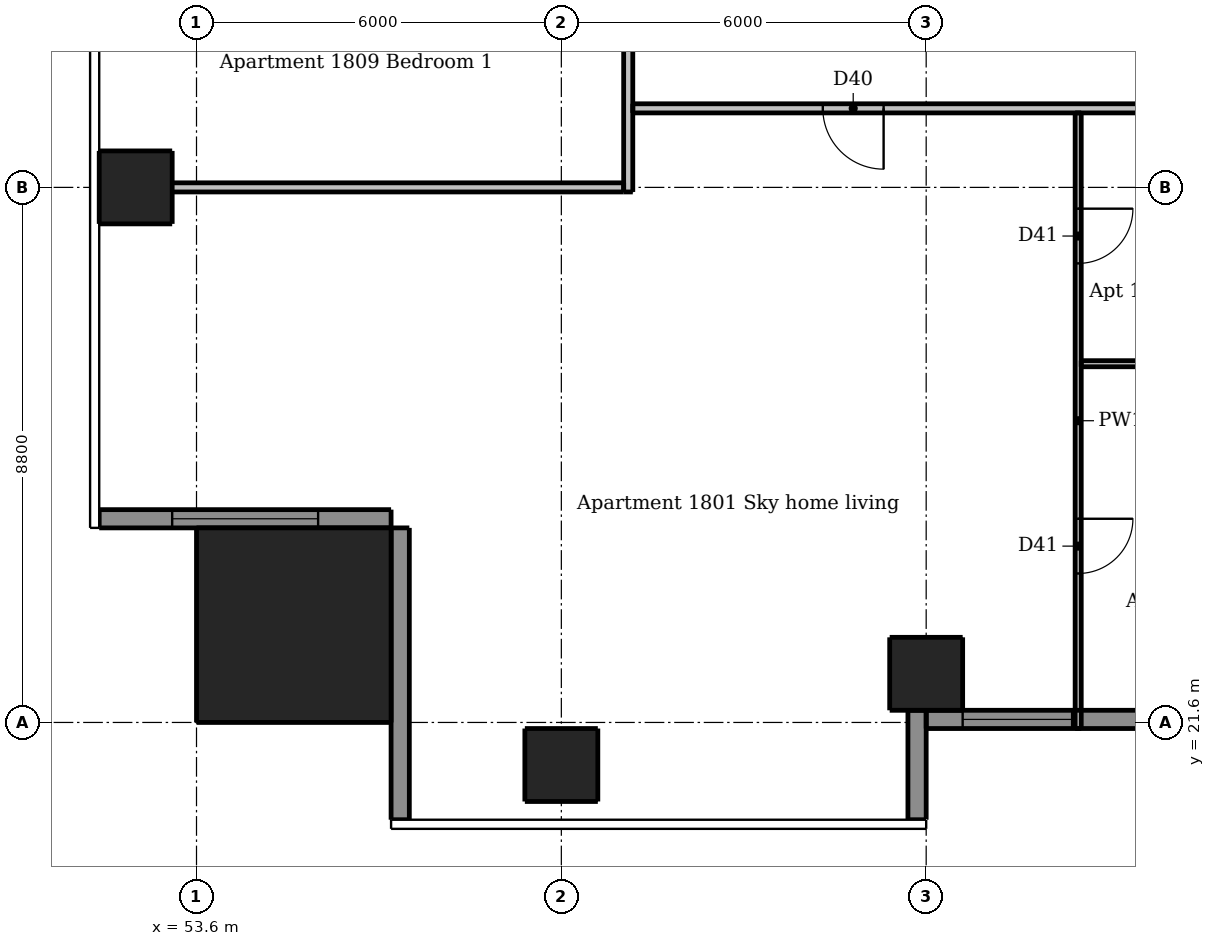
"""IFC4 building model, lengths in metres.
Left out: names, types, materials, properties, quantities, classifications, styles, units other than length and angle.
Written with IfcOpenShell. Run it as: python <this file> out.ifc"""

import sys

from ifc_helpers import new_model, si_unit, direction, frame, frame_2d, origin, origin_2d, place, context, subcontext, project, spatial, rectangle, extrude, element, fill, save


model = new_model("IFC4")
c1 = context("Model", 3, precision=1e-05, world=origin(), true_north=direction((0.0, 1.0)))
c2 = subcontext(c1, "Body", "Model", "MODEL_VIEW")
j1 = project(units=[si_unit("LENGTHUNIT", "METRE"), si_unit("PLANEANGLEUNIT", "RADIAN")], contexts=[c1])
p1 = place(None, origin())
s1 = spatial("IfcSite", under=j1, at=p1, CompositionType="ELEMENT")
p2 = place(p1, origin())
s2 = spatial("IfcBuilding", under=s1, at=p2, CompositionType="ELEMENT")
p3 = place(p2, frame((0.0, 0.0, 66.4)))
s3 = spatial("IfcBuildingStorey", under=s2, at=p3, CompositionType="ELEMENT", Elevation=66.4)
for number, where, z_axis, x_axis in (
    (1, (59.6, 20.9, 0.0), (0.0, 0.0, 1.0), (1.0, 0.0, 0.0)),
    (2, (65.6, 22.4, 0.0), (0.0, 0.0, 1.0), (1.0, 0.0, 0.0)),
    (3, (52.6, 30.4, 0.0), (0.0, 0.0, 1.0), (1.0, 0.0, 0.0)),
):
    element("IfcColumn", number, at=place(p3, frame(where, z_axis=z_axis, x_axis=x_axis)), inside=s3, PredefinedType="COLUMN", context=c2, shape_type="SweptSolid", body=[
        extrude(rectangle(XDim=1.2, YDim=1.2, at=origin_2d()), origin(), (0.0, 0.0, 1.0), 2.95),
    ])
p4 = place(p3, frame((55.2, 23.2, 0.0), z_axis=(0.0, 0.0, 1.0), x_axis=(1.0, 0.0, 0.0)))
e4 = element("IfcColumn", 4, at=p4, inside=s3, PredefinedType="COLUMN", context=c2, shape_type="SweptSolid", body=[
    extrude(rectangle(XDim=3.2, YDim=3.2, at=origin_2d()), origin(), (0.0, 0.0, 1.0), 3.3),
])
p5 = place(p3, frame((65.45, 20.0, 0.0), z_axis=(0.0, 0.0, 1.0), x_axis=(0.0, 1.0, 0.0)))
e5 = element("IfcWall", 5, at=p5, inside=s3, PredefinedType="SOLIDWALL", context=c2, shape_type="SweptSolid", body=[
    extrude(rectangle(XDim=1.8, YDim=0.3, at=frame_2d((0.9, 0.0))), origin(), (0.0, 0.0, 1.0), 2.95),
])
p6 = place(p3, frame((52.0, 24.95, 0.0), z_axis=(0.0, 0.0, 1.0), x_axis=(1.0, 0.0, 0.0)))
e6 = element("IfcWall", 6, at=p6, inside=s3, PredefinedType="SOLIDWALL", context=c2, shape_type="SweptSolid", body=[
    extrude(rectangle(XDim=4.8, YDim=0.3, at=frame_2d((2.4, 0.0))), origin(), (0.0, 0.0, 1.0), 2.95),
])
p7 = place(p6, frame((1.2, 0.0, 0.15)))
e7 = element("IfcOpeningElement", 7, at=p7, cuts=e6, PredefinedType="OPENING", context=c2, shape_type="SweptSolid", body=[
    extrude(rectangle(XDim=2.4, YDim=2.1, at=frame_2d((1.2, 1.05))), frame((0.0, 0.16, 0.0), z_axis=(0.0, -1.0, 0.0), x_axis=(1.0, 0.0, 0.0)), (0.0, 0.0, 1.0), 0.32),
])
p8 = place(p3, frame((56.95, 24.8, 0.0), z_axis=(0.0, 0.0, 1.0), x_axis=(0.0, -1.0, 0.0)))
e8 = element("IfcWall", 8, at=p8, inside=s3, PredefinedType="SOLIDWALL", context=c2, shape_type="SweptSolid", body=[
    extrude(rectangle(XDim=4.8, YDim=0.3, at=frame_2d((2.4, 0.0))), origin(), (0.0, 0.0, 1.0), 2.95),
])
p9 = place(p3, frame((65.6, 21.65, 0.0), z_axis=(0.0, 0.0, 1.0), x_axis=(1.0, 0.0, 0.0)))
e9 = element("IfcWall", 9, at=p9, inside=s3, PredefinedType="SOLIDWALL", context=c2, shape_type="SweptSolid", body=[
    extrude(rectangle(XDim=6.0, YDim=0.3, at=frame_2d((3.0, 0.0))), origin(), (0.0, 0.0, 1.0), 2.341),
])
p10 = place(p9, frame((0.6, 0.0, 0.15)))
e10 = element("IfcOpeningElement", 10, at=p10, cuts=e9, PredefinedType="OPENING", context=c2, shape_type="SweptSolid", body=[
    extrude(rectangle(XDim=1.8, YDim=2.1, at=frame_2d((0.9, 1.05))), frame((0.0, 0.16, 0.0), z_axis=(0.0, -1.0, 0.0), x_axis=(1.0, 0.0, 0.0)), (0.0, 0.0, 1.0), 0.32),
])
p11 = place(p9, frame((3.6, 0.0, 0.15)))
e11 = element("IfcOpeningElement", 11, at=p11, cuts=e9, PredefinedType="OPENING", context=c2, shape_type="SweptSolid", body=[
    extrude(rectangle(XDim=1.8, YDim=2.1, at=frame_2d((0.9, 1.05))), frame((0.0, 0.16, 0.0), z_axis=(0.0, -1.0, 0.0), x_axis=(1.0, 0.0, 0.0)), (0.0, 0.0, 1.0), 0.32),
])
p12 = place(p3, frame((68.1, 31.625, 0.0), z_axis=(0.0, 0.0, 1.0), x_axis=(0.0, -1.0, 0.0)))
e12 = element("IfcWall", 12, at=p12, inside=s3, PredefinedType="PARTITIONING", context=c2, shape_type="SweptSolid", body=[
    extrude(rectangle(XDim=10.125, YDim=0.1, at=frame_2d((5.062, 0.0))), origin(), (0.0, 0.0, 1.0), 2.95),
])
p13 = place(p12, frame((1.575, 0.0, 0.0)))
e13 = element("IfcOpeningElement", 13, at=p13, cuts=e12, PredefinedType="OPENING", context=c2, shape_type="SweptSolid", body=[
    extrude(rectangle(XDim=0.9, YDim=2.1, at=frame_2d((0.45, 1.05))), frame((0.0, 0.06, 0.0), z_axis=(0.0, -1.0, 0.0), x_axis=(1.0, 0.0, 0.0)), (0.0, 0.0, 1.0), 0.12),
])
p14 = place(p12, frame((6.675, 0.0, 0.0)))
e14 = element("IfcOpeningElement", 14, at=p14, cuts=e12, PredefinedType="OPENING", context=c2, shape_type="SweptSolid", body=[
    extrude(rectangle(XDim=0.9, YDim=2.1, at=frame_2d((0.45, 1.05))), frame((0.0, 0.06, 0.0), z_axis=(0.0, -1.0, 0.0), x_axis=(1.0, 0.0, 0.0)), (0.0, 0.0, 1.0), 0.12),
])
p15 = place(p3, frame((68.15, 27.5, 0.0), z_axis=(0.0, 0.0, 1.0), x_axis=(1.0, 0.0, 0.0)))
e15 = element("IfcWall", 15, at=p15, inside=s3, PredefinedType="PARTITIONING", context=c2, shape_type="SweptSolid", body=[
    extrude(rectangle(XDim=6.375, YDim=0.1, at=frame_2d((3.188, 0.0))), origin(), (0.0, 0.0, 1.0), 2.95),
])
p16 = place(p15, frame((4.0, 0.0, 0.0)))
e16 = element("IfcOpeningElement", 16, at=p16, cuts=e15, PredefinedType="OPENING", context=c2, shape_type="SweptSolid", body=[
    extrude(rectangle(XDim=0.8, YDim=2.1, at=frame_2d((0.4, 1.05))), frame((0.0, 0.06, 0.0), z_axis=(0.0, -1.0, 0.0), x_axis=(1.0, 0.0, 0.0)), (0.0, 0.0, 1.0), 0.12),
])
p17 = place(p3, frame((60.7, 30.325, 0.0), z_axis=(0.0, 0.0, 1.0), x_axis=(0.0, 1.0, 0.0)))
e17 = element("IfcWall", 17, at=p17, inside=s3, PredefinedType="PARTITIONING", context=c2, shape_type="SweptSolid", body=[
    extrude(rectangle(XDim=28.9, YDim=0.15, at=frame_2d((14.45, 0.0))), origin(), (0.0, 0.0, 1.0), 2.95),
])
p18 = place(p17, frame((7.375, 0.0, 0.0)))
e18 = element("IfcOpeningElement", 18, at=p18, cuts=e17, PredefinedType="OPENING", context=c2, shape_type="SweptSolid", body=[
    extrude(rectangle(XDim=1.0, YDim=2.1, at=frame_2d((0.5, 1.05))), frame((0.0, 0.085, 0.0), z_axis=(0.0, -1.0, 0.0), x_axis=(1.0, 0.0, 0.0)), (0.0, 0.0, 1.0), 0.17),
])
p19 = place(p17, frame((14.575, 0.0, 0.0)))
e19 = element("IfcOpeningElement", 19, at=p19, cuts=e17, PredefinedType="OPENING", context=c2, shape_type="SweptSolid", body=[
    extrude(rectangle(XDim=1.0, YDim=2.1, at=frame_2d((0.5, 1.05))), frame((0.0, 0.085, 0.0), z_axis=(0.0, -1.0, 0.0), x_axis=(1.0, 0.0, 0.0)), (0.0, 0.0, 1.0), 0.17),
])
p20 = place(p17, frame((26.025, 0.0, 0.0)))
e20 = element("IfcOpeningElement", 20, at=p20, cuts=e17, PredefinedType="OPENING", context=c2, shape_type="SweptSolid", body=[
    extrude(rectangle(XDim=1.0, YDim=2.1, at=frame_2d((0.5, 1.05))), frame((0.0, 0.085, 0.0), z_axis=(0.0, -1.0, 0.0), x_axis=(1.0, 0.0, 0.0)), (0.0, 0.0, 1.0), 0.17),
])
p21 = place(p3, frame((89.525, 31.7, 0.0), z_axis=(0.0, 0.0, 1.0), x_axis=(-1.0, 0.0, 0.0)))
e21 = element("IfcWall", 21, at=p21, inside=s3, PredefinedType="PARTITIONING", context=c2, shape_type="SweptSolid", body=[
    extrude(rectangle(XDim=28.75, YDim=0.15, at=frame_2d((14.375, 0.0))), origin(), (0.0, 0.0, 1.0), 2.95),
])
p22 = place(p21, frame((24.625, 0.0, 0.0)))
e22 = element("IfcOpeningElement", 22, at=p22, cuts=e21, PredefinedType="OPENING", context=c2, shape_type="SweptSolid", body=[
    extrude(rectangle(XDim=1.0, YDim=2.1, at=frame_2d((0.5, 1.05))), frame((0.0, 0.085, 0.0), z_axis=(0.0, -1.0, 0.0), x_axis=(1.0, 0.0, 0.0)), (0.0, 0.0, 1.0), 0.17),
])
p23 = place(p21, frame((8.425, 0.0, 0.0)))
e23 = element("IfcOpeningElement", 23, at=p23, cuts=e21, PredefinedType="OPENING", context=c2, shape_type="SweptSolid", body=[
    extrude(rectangle(XDim=1.0, YDim=2.1, at=frame_2d((0.5, 1.05))), frame((0.0, 0.085, 0.0), z_axis=(0.0, -1.0, 0.0), x_axis=(1.0, 0.0, 0.0)), (0.0, 0.0, 1.0), 0.17),
])
p24 = place(p3, frame((52.0, 30.4, 0.0), z_axis=(0.0, 0.0, 1.0), x_axis=(1.0, 0.0, 0.0)))
e24 = element("IfcWall", 24, at=p24, inside=s3, PredefinedType="PARTITIONING", context=c2, shape_type="SweptSolid", body=[
    extrude(rectangle(XDim=8.625, YDim=0.15, at=frame_2d((4.312, 0.0))), origin(), (0.0, 0.0, 1.0), 2.332),
])
p25 = place(p7, origin())
e25 = element("IfcWindow", 25, at=p25, inside=s3, PartitioningType="DOUBLE_PANEL_VERTICAL", PredefinedType="WINDOW", context=c2, shape_type="SweptSolid", body=[
    extrude(rectangle(XDim=2.4, YDim=2.1, at=frame_2d((1.2, 1.05))), frame((0.0, 0.03, 0.0), z_axis=(0.0, -1.0, 0.0), x_axis=(1.0, 0.0, 0.0)), (0.0, 0.0, 1.0), 0.06),
])
fill(e7, e25)
p26 = place(p10, origin())
e26 = element("IfcWindow", 26, at=p26, inside=s3, PartitioningType="DOUBLE_PANEL_VERTICAL", PredefinedType="WINDOW", context=c2, shape_type="SweptSolid", body=[
    extrude(rectangle(XDim=1.8, YDim=2.1, at=frame_2d((0.9, 1.05))), frame((0.0, 0.03, 0.0), z_axis=(0.0, -1.0, 0.0), x_axis=(1.0, 0.0, 0.0)), (0.0, 0.0, 1.0), 0.06),
])
fill(e10, e26)
p27 = place(p22, origin())
e27 = element("IfcDoor", 27, at=p27, inside=s3, OperationType="SINGLE_SWING_LEFT", PredefinedType="DOOR", context=c2, shape_type="SweptSolid", body=[
    extrude(rectangle(XDim=1.0, YDim=2.1, at=frame_2d((0.5, 1.05))), frame((0.0, 0.025, 0.0), z_axis=(0.0, -1.0, 0.0), x_axis=(1.0, 0.0, 0.0)), (0.0, 0.0, 1.0), 0.05),
])
fill(e22, e27)
p28 = place(p13, origin())
e28 = element("IfcDoor", 28, at=p28, inside=s3, OperationType="SINGLE_SWING_LEFT", PredefinedType="DOOR", context=c2, shape_type="SweptSolid", body=[
    extrude(rectangle(XDim=0.9, YDim=2.1, at=frame_2d((0.45, 1.05))), frame((0.0, 0.025, 0.0), z_axis=(0.0, -1.0, 0.0), x_axis=(1.0, 0.0, 0.0)), (0.0, 0.0, 1.0), 0.05),
])
fill(e13, e28)
p29 = place(p14, origin())
e29 = element("IfcDoor", 29, at=p29, inside=s3, OperationType="SINGLE_SWING_LEFT", PredefinedType="DOOR", context=c2, shape_type="SweptSolid", body=[
    extrude(rectangle(XDim=0.9, YDim=2.1, at=frame_2d((0.45, 1.05))), frame((0.0, 0.025, 0.0), z_axis=(0.0, -1.0, 0.0), x_axis=(1.0, 0.0, 0.0)), (0.0, 0.0, 1.0), 0.05),
])
fill(e14, e29)
save(model, sys.argv[1])
